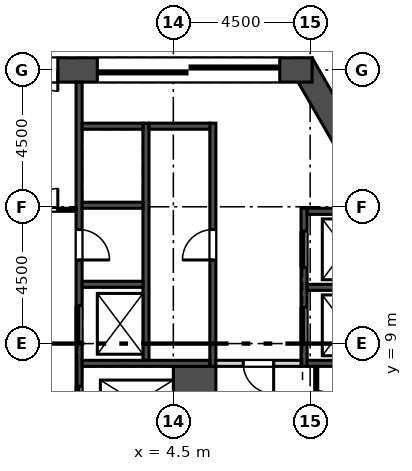
"""IFC4 building model, lengths in metres.
Left out: names, types, materials, properties, quantities, classifications, styles, units other than length and angle.
Written with IfcOpenShell. Run it as: python <this file> out.ifc"""

import sys

from ifc_helpers import new_model, si_unit, direction, frame, frame_2d, origin, place, context, subcontext, project, spatial, rectangle, extrude, element, fill, save


model = new_model("IFC4")
c1 = context("Model", 3, precision=1e-05, world=origin(), true_north=direction((0.0, 1.0)))
c2 = subcontext(c1, "Body", "Model", "MODEL_VIEW")
j1 = project(units=[si_unit("LENGTHUNIT", "METRE"), si_unit("PLANEANGLEUNIT", "RADIAN")], contexts=[c1])
p1 = place(None, origin())
s1 = spatial("IfcSite", under=j1, at=p1, CompositionType="ELEMENT")
p2 = place(p1, origin())
s2 = spatial("IfcBuilding", under=s1, at=p2, CompositionType="ELEMENT")
p3 = place(p2, frame((0.0, 0.0, 335.1)))
s3 = spatial("IfcBuildingStorey", under=s2, at=p3, CompositionType="ELEMENT", Elevation=335.1)
p4 = place(p3, frame((13.054, 10.692, 0.0), z_axis=(0.0, 0.0, 1.0), x_axis=(-0.500015780397, 0.866016292776, 0.0)))
e1 = element("IfcWall", 1, at=p4, inside=s3, PredefinedType="SHEAR", context=c2, shape_type="SweptSolid", body=[
    extrude(rectangle(XDim=8.67, YDim=0.8, at=frame_2d((4.335, 0.0))), origin(), (0.0, 0.0, 1.0), 4.2),
])
p5 = place(p3, frame((9.065, 18.0, 0.0), z_axis=(0.0, 0.0, 1.0), x_axis=(-1.0, 0.0, 0.0)))
e2 = element("IfcWall", 2, at=p5, inside=s3, PredefinedType="SHEAR", context=c2, shape_type="SweptSolid", body=[
    extrude(rectangle(XDim=18.13, YDim=0.8, at=frame_2d((9.065, 0.0))), origin(), (0.0, 0.0, 1.0), 4.2),
])
p6 = place(p5, frame((8.365, 0.0, 0.0)))
e3 = element("IfcOpeningElement", 3, at=p6, cuts=e2, PredefinedType="OPENING", context=c2, shape_type="SweptSolid", body=[
    extrude(rectangle(XDim=1.4, YDim=2.1, at=frame_2d((0.7, 1.05))), frame((0.0, 0.41, 0.0), z_axis=(0.0, -1.0, 0.0), x_axis=(1.0, 0.0, 0.0)), (0.0, 0.0, 1.0), 0.82),
])
p7 = place(p5, frame((11.065, 0.0, 0.0)))
e4 = element("IfcOpeningElement", 4, at=p7, cuts=e2, PredefinedType="OPENING", context=c2, shape_type="SweptSolid", body=[
    extrude(rectangle(XDim=6.0, YDim=2.4, at=frame_2d((3.0, 1.2))), frame((0.0, 0.41, 0.0), z_axis=(0.0, -1.0, 0.0), x_axis=(1.0, 0.0, 0.0)), (0.0, 0.0, 1.0), 0.82),
])
p8 = place(p5, frame((1.065, 0.0, 0.0)))
e5 = element("IfcOpeningElement", 5, at=p8, cuts=e2, PredefinedType="OPENING", context=c2, shape_type="SweptSolid", body=[
    extrude(rectangle(XDim=6.0, YDim=2.4, at=frame_2d((3.0, 1.2))), frame((0.0, 0.41, 0.0), z_axis=(0.0, -1.0, 0.0), x_axis=(1.0, 0.0, 0.0)), (0.0, 0.0, 1.0), 0.82),
])
p9 = place(p3, frame((23.788, 7.709, 0.0), z_axis=(0.0, 0.0, 1.0), x_axis=(-0.500001731347, 0.866024404189, 0.0)))
e6 = element("IfcWall", 6, at=p9, inside=s3, PredefinedType="SOLIDWALL", context=c2, shape_type="SweptSolid", body=[
    extrude(rectangle(XDim=38.87, YDim=0.34, at=frame_2d((19.435, 0.0))), origin(), (0.0, 0.0, 1.0), 3.8),
])
p10 = place(p9, frame((3.218, 0.0, 0.9)))
e7 = element("IfcOpeningElement", 7, at=p10, cuts=e6, PredefinedType="OPENING", context=c2, shape_type="SweptSolid", body=[
    extrude(rectangle(XDim=1.885, YDim=2.6, at=frame_2d((0.942, 1.3))), frame((0.0, 0.18, 0.0), z_axis=(0.0, -1.0, 0.0), x_axis=(1.0, 0.0, 0.0)), (0.0, 0.0, 1.0), 0.36),
])
p11 = place(p9, frame((6.218, 0.0, 0.9)))
e8 = element("IfcOpeningElement", 8, at=p11, cuts=e6, PredefinedType="OPENING", context=c2, shape_type="SweptSolid", body=[
    extrude(rectangle(XDim=1.885, YDim=2.6, at=frame_2d((0.942, 1.3))), frame((0.0, 0.18, 0.0), z_axis=(0.0, -1.0, 0.0), x_axis=(1.0, 0.0, 0.0)), (0.0, 0.0, 1.0), 0.36),
])
p12 = place(p9, frame((9.218, 0.0, 0.9)))
e9 = element("IfcOpeningElement", 9, at=p12, cuts=e6, PredefinedType="OPENING", context=c2, shape_type="SweptSolid", body=[
    extrude(rectangle(XDim=1.885, YDim=2.6, at=frame_2d((0.942, 1.3))), frame((0.0, 0.18, 0.0), z_axis=(0.0, -1.0, 0.0), x_axis=(1.0, 0.0, 0.0)), (0.0, 0.0, 1.0), 0.36),
])
p13 = place(p9, frame((12.218, 0.0, 0.9)))
e10 = element("IfcOpeningElement", 10, at=p13, cuts=e6, PredefinedType="OPENING", context=c2, shape_type="SweptSolid", body=[
    extrude(rectangle(XDim=1.885, YDim=2.6, at=frame_2d((0.942, 1.3))), frame((0.0, 0.18, 0.0), z_axis=(0.0, -1.0, 0.0), x_axis=(1.0, 0.0, 0.0)), (0.0, 0.0, 1.0), 0.36),
])
p14 = place(p9, frame((15.218, 0.0, 0.9)))
e11 = element("IfcOpeningElement", 11, at=p14, cuts=e6, PredefinedType="OPENING", context=c2, shape_type="SweptSolid", body=[
    extrude(rectangle(XDim=1.885, YDim=2.6, at=frame_2d((0.942, 1.3))), frame((0.0, 0.18, 0.0), z_axis=(0.0, -1.0, 0.0), x_axis=(1.0, 0.0, 0.0)), (0.0, 0.0, 1.0), 0.36),
])
p15 = place(p9, frame((18.218, 0.0, 0.9)))
e12 = element("IfcOpeningElement", 12, at=p15, cuts=e6, PredefinedType="OPENING", context=c2, shape_type="SweptSolid", body=[
    extrude(rectangle(XDim=1.885, YDim=2.6, at=frame_2d((0.942, 1.3))), frame((0.0, 0.18, 0.0), z_axis=(0.0, -1.0, 0.0), x_axis=(1.0, 0.0, 0.0)), (0.0, 0.0, 1.0), 0.36),
])
p16 = place(p9, frame((21.218, 0.0, 0.9)))
e13 = element("IfcOpeningElement", 13, at=p16, cuts=e6, PredefinedType="OPENING", context=c2, shape_type="SweptSolid", body=[
    extrude(rectangle(XDim=1.885, YDim=2.6, at=frame_2d((0.942, 1.3))), frame((0.0, 0.18, 0.0), z_axis=(0.0, -1.0, 0.0), x_axis=(1.0, 0.0, 0.0)), (0.0, 0.0, 1.0), 0.36),
])
p17 = place(p9, frame((24.218, 0.0, 0.9)))
e14 = element("IfcOpeningElement", 14, at=p17, cuts=e6, PredefinedType="OPENING", context=c2, shape_type="SweptSolid", body=[
    extrude(rectangle(XDim=1.885, YDim=2.6, at=frame_2d((0.942, 1.3))), frame((0.0, 0.18, 0.0), z_axis=(0.0, -1.0, 0.0), x_axis=(1.0, 0.0, 0.0)), (0.0, 0.0, 1.0), 0.36),
])
p18 = place(p9, frame((27.218, 0.0, 0.9)))
e15 = element("IfcOpeningElement", 15, at=p18, cuts=e6, PredefinedType="OPENING", context=c2, shape_type="SweptSolid", body=[
    extrude(rectangle(XDim=1.885, YDim=2.6, at=frame_2d((0.942, 1.3))), frame((0.0, 0.18, 0.0), z_axis=(0.0, -1.0, 0.0), x_axis=(1.0, 0.0, 0.0)), (0.0, 0.0, 1.0), 0.36),
])
p19 = place(p9, frame((30.218, 0.0, 0.9)))
e16 = element("IfcOpeningElement", 16, at=p19, cuts=e6, PredefinedType="OPENING", context=c2, shape_type="SweptSolid", body=[
    extrude(rectangle(XDim=1.885, YDim=2.6, at=frame_2d((0.942, 1.3))), frame((0.0, 0.18, 0.0), z_axis=(0.0, -1.0, 0.0), x_axis=(1.0, 0.0, 0.0)), (0.0, 0.0, 1.0), 0.36),
])
p20 = place(p9, frame((33.218, 0.0, 0.9)))
e17 = element("IfcOpeningElement", 17, at=p20, cuts=e6, PredefinedType="OPENING", context=c2, shape_type="SweptSolid", body=[
    extrude(rectangle(XDim=1.885, YDim=2.6, at=frame_2d((0.942, 1.3))), frame((0.0, 0.18, 0.0), z_axis=(0.0, -1.0, 0.0), x_axis=(1.0, 0.0, 0.0)), (0.0, 0.0, 1.0), 0.36),
])
p21 = place(p9, frame((1.051, 0.0, 0.9)))
e18 = element("IfcOpeningElement", 18, at=p21, cuts=e6, PredefinedType="OPENING", context=c2, shape_type="SweptSolid", body=[
    extrude(rectangle(XDim=1.115, YDim=2.4, at=frame_2d((0.558, 1.2))), frame((0.0, 0.18, 0.0), z_axis=(0.0, -1.0, 0.0), x_axis=(1.0, 0.0, 0.0)), (0.0, 0.0, 1.0), 0.36),
])
p22 = place(p9, frame((36.429, 0.0, 0.9)))
e19 = element("IfcOpeningElement", 19, at=p22, cuts=e6, PredefinedType="OPENING", context=c2, shape_type="SweptSolid", body=[
    extrude(rectangle(XDim=1.115, YDim=2.4, at=frame_2d((0.558, 1.2))), frame((0.0, 0.18, 0.0), z_axis=(0.0, -1.0, 0.0), x_axis=(1.0, 0.0, 0.0)), (0.0, 0.0, 1.0), 0.36),
])
p23 = place(p3, frame((8.8, 8.25, -0.4), z_axis=(0.0, 0.0, 1.0), x_axis=(0.0, 1.0, 0.0)))
e20 = element("IfcWall", 20, at=p23, inside=s3, PredefinedType="SOLIDWALL", context=c2, shape_type="SweptSolid", body=[
    extrude(rectangle(XDim=5.2, YDim=0.2, at=frame_2d((2.6, 0.0))), origin(), (0.0, 0.0, 1.0), 4.2),
])
p24 = place(p23, frame((0.75, 0.0, 0.4)))
e21 = element("IfcOpeningElement", 21, at=p24, cuts=e20, PredefinedType="OPENING", context=c2, shape_type="SweptSolid", body=[
    extrude(rectangle(XDim=1.2, YDim=2.1, at=frame_2d((0.6, 1.05))), frame((0.0, 0.11, 0.0), z_axis=(0.0, -1.0, 0.0), x_axis=(1.0, 0.0, 0.0)), (0.0, 0.0, 1.0), 0.22),
])
p25 = place(p23, frame((3.25, 0.0, 0.4)))
e22 = element("IfcOpeningElement", 22, at=p25, cuts=e20, PredefinedType="OPENING", context=c2, shape_type="SweptSolid", body=[
    extrude(rectangle(XDim=1.2, YDim=2.1, at=frame_2d((0.6, 1.05))), frame((0.0, 0.11, 0.0), z_axis=(0.0, -1.0, 0.0), x_axis=(1.0, 0.0, 0.0)), (0.0, 0.0, 1.0), 0.22),
])
p26 = place(p3, frame((5.8, 8.25, -0.4), z_axis=(0.0, 0.0, 1.0), x_axis=(0.0, 1.0, 0.0)))
e23 = element("IfcWall", 23, at=p26, inside=s3, PredefinedType="SOLIDWALL", context=c2, shape_type="SweptSolid", body=[
    extrude(rectangle(XDim=8.0, YDim=0.2, at=frame_2d((4.0, 0.0))), origin(), (0.0, 0.0, 1.0), 4.2),
])
p27 = place(p26, frame((3.5, 0.0, 0.4)))
e24 = element("IfcOpeningElement", 24, at=p27, cuts=e23, PredefinedType="OPENING", context=c2, shape_type="SweptSolid", body=[
    extrude(rectangle(XDim=1.0, YDim=2.1, at=frame_2d((0.5, 1.05))), frame((0.0, 0.11, 0.0), z_axis=(0.0, -1.0, 0.0), x_axis=(1.0, 0.0, 0.0)), (0.0, 0.0, 1.0), 0.22),
])
p28 = place(p3, frame((3.6, 8.45, -0.4), z_axis=(0.0, 0.0, 1.0), x_axis=(0.0, 1.0, 0.0)))
e25 = element("IfcWall", 25, at=p28, inside=s3, PredefinedType="SOLIDWALL", context=c2, shape_type="SweptSolid", body=[
    extrude(rectangle(XDim=7.8, YDim=0.2, at=frame_2d((3.9, 0.0))), origin(), (0.0, 0.0, 1.0), 4.2),
])
p29 = place(p3, frame((1.4, 5.85, -0.4), z_axis=(0.0, 0.0, 1.0), x_axis=(0.0, 1.0, 0.0)))
e26 = element("IfcWall", 26, at=p29, inside=s3, PredefinedType="SOLIDWALL", context=c2, shape_type="SweptSolid", body=[
    extrude(rectangle(XDim=11.75, YDim=0.2, at=frame_2d((5.875, 0.0))), origin(), (0.0, 0.0, 1.0), 4.2),
])
p30 = place(p29, frame((3.2, 0.0, 0.4)))
e27 = element("IfcOpeningElement", 27, at=p30, cuts=e26, PredefinedType="OPENING", context=c2, shape_type="SweptSolid", body=[
    extrude(rectangle(XDim=1.2, YDim=2.1, at=frame_2d((0.6, 1.05))), frame((0.0, 0.11, 0.0), z_axis=(0.0, -1.0, 0.0), x_axis=(1.0, 0.0, 0.0)), (0.0, 0.0, 1.0), 0.22),
])
p31 = place(p29, frame((0.65, 0.0, 0.4)))
e28 = element("IfcOpeningElement", 28, at=p31, cuts=e26, PredefinedType="OPENING", context=c2, shape_type="SweptSolid", body=[
    extrude(rectangle(XDim=1.1, YDim=2.1, at=frame_2d((0.55, 1.05))), frame((0.0, 0.11, 0.0), z_axis=(0.0, -1.0, 0.0), x_axis=(1.0, 0.0, 0.0)), (0.0, 0.0, 1.0), 0.22),
])
p32 = place(p29, frame((5.9, 0.0, 0.4)))
e29 = element("IfcOpeningElement", 29, at=p32, cuts=e26, PredefinedType="OPENING", context=c2, shape_type="SweptSolid", body=[
    extrude(rectangle(XDim=1.0, YDim=2.1, at=frame_2d((0.5, 1.05))), frame((0.0, 0.11, 0.0), z_axis=(0.0, -1.0, 0.0), x_axis=(1.0, 0.0, 0.0)), (0.0, 0.0, 1.0), 0.22),
])
p33 = place(p3, frame((5.2, 5.85, -0.4), z_axis=(0.0, 0.0, 1.0), x_axis=(0.0, 1.0, 0.0)))
e30 = element("IfcWall", 30, at=p33, inside=s3, PredefinedType="SOLIDWALL", context=c2, shape_type="SweptSolid", body=[
    extrude(rectangle(XDim=2.4, YDim=1.4, at=frame_2d((1.2, 0.0))), origin(), (0.0, 0.0, 1.0), 4.2),
])
p34 = place(p3, frame((8.9, 8.35, -0.4), z_axis=(0.0, 0.0, 1.0), x_axis=(1.0, 0.0, 0.0)))
e31 = element("IfcWall", 31, at=p34, inside=s3, PredefinedType="SOLIDWALL", context=c2, shape_type="SweptSolid", body=[
    extrude(rectangle(XDim=2.0, YDim=0.2, at=frame_2d((1.0, 0.0))), origin(), (0.0, 0.0, 1.0), 4.2),
])
p35 = place(p3, frame((1.5, 8.35, -0.4), z_axis=(0.0, 0.0, 1.0), x_axis=(1.0, 0.0, 0.0)))
e32 = element("IfcWall", 32, at=p35, inside=s3, PredefinedType="SOLIDWALL", context=c2, shape_type="SweptSolid", body=[
    extrude(rectangle(XDim=4.2, YDim=0.2, at=frame_2d((2.1, 0.0))), origin(), (0.0, 0.0, 1.0), 4.2),
])
for number, where, z_axis, x_axis in (
    (33, (8.9, 10.85, -0.4), (0.0, 0.0, 1.0), (1.0, 0.0, 0.0)),
    (34, (8.9, 13.35, -0.4), (0.0, 0.0, 1.0), (1.0, 0.0, 0.0)),
    (35, (3.7, 16.15, -0.4), (0.0, 0.0, 1.0), (1.0, 0.0, 0.0)),
    (36, (1.5, 10.95, -0.4), (0.0, 0.0, 1.0), (1.0, 0.0, 0.0)),
    (37, (1.5, 13.55, -0.4), (0.0, 0.0, 1.0), (1.0, 0.0, 0.0)),
    (38, (1.5, 16.15, -0.4), (0.0, 0.0, 1.0), (1.0, 0.0, 0.0)),
):
    element("IfcWall", number, at=place(p3, frame(where, z_axis=z_axis, x_axis=x_axis)), inside=s3, PredefinedType="SOLIDWALL", context=c2, shape_type="SweptSolid", body=[
        extrude(rectangle(XDim=2.0, YDim=0.2, at=frame_2d((1.0, 0.0))), origin(), (0.0, 0.0, 1.0), 4.2),
    ])
p36 = place(p3, frame((9.2, 5.85, 0.0), z_axis=(0.0, 0.0, 1.0), x_axis=(0.0, 1.0, 0.0)))
e39 = element("IfcWall", 39, at=p36, inside=s3, PredefinedType="PARTITIONING", context=c2, shape_type="SweptSolid", body=[
    extrude(rectangle(XDim=2.4, YDim=0.1, at=frame_2d((1.2, 0.0))), origin(), (0.0, 0.0, 1.0), 3.8),
])
p37 = place(p36, frame((0.7, 0.0, 0.0)))
e40 = element("IfcOpeningElement", 40, at=p37, cuts=e39, PredefinedType="OPENING", context=c2, shape_type="SweptSolid", body=[
    extrude(rectangle(XDim=0.9, YDim=2.1, at=frame_2d((0.45, 1.05))), frame((0.0, 0.06, 0.0), z_axis=(0.0, -1.0, 0.0), x_axis=(1.0, 0.0, 0.0)), (0.0, 0.0, 1.0), 0.12),
])
p38 = place(p3, frame((5.9, 8.35, 0.0), z_axis=(0.0, 0.0, 1.0), x_axis=(1.0, 0.0, 0.0)))
e41 = element("IfcWall", 41, at=p38, inside=s3, PredefinedType="SOLIDWALL", context=c2, shape_type="SweptSolid", body=[
    extrude(rectangle(XDim=2.8, YDim=0.2, at=frame_2d((1.4, 0.0))), origin(), (0.0, 0.0, 1.0), 3.8),
])
p39 = place(p38, frame((0.9, 0.0, 0.0)))
e42 = element("IfcOpeningElement", 42, at=p39, cuts=e41, PredefinedType="OPENING", context=c2, shape_type="SweptSolid", body=[
    extrude(rectangle(XDim=1.0, YDim=2.1, at=frame_2d((0.5, 1.05))), frame((0.0, 0.11, 0.0), z_axis=(0.0, -1.0, 0.0), x_axis=(1.0, 0.0, 0.0)), (0.0, 0.0, 1.0), 0.22),
])
p40 = place(p3, frame((-1.3, 13.4, 0.0), z_axis=(0.0, 0.0, 1.0), x_axis=(1.0, 0.0, 0.0)))
e43 = element("IfcWall", 43, at=p40, inside=s3, PredefinedType="PARTITIONING", context=c2, shape_type="SweptSolid", body=[
    extrude(rectangle(XDim=2.6, YDim=0.1, at=frame_2d((1.3, 0.0))), origin(), (0.0, 0.0, 1.0), 3.8),
])
p41 = place(p40, frame((0.6, 0.0, 0.0)))
e44 = element("IfcOpeningElement", 44, at=p41, cuts=e43, PredefinedType="OPENING", context=c2, shape_type="SweptSolid", body=[
    extrude(rectangle(XDim=1.4, YDim=2.1, at=frame_2d((0.7, 1.05))), frame((0.0, 0.06, 0.0), z_axis=(0.0, -1.0, 0.0), x_axis=(1.0, 0.0, 0.0)), (0.0, 0.0, 1.0), 0.12),
])
p42 = place(p24, origin())
e45 = element("IfcDoor", 45, at=p42, inside=s3, OperationType="SLIDING_TO_LEFT", PredefinedType="DOOR", context=c2, shape_type="SweptSolid", body=[
    extrude(rectangle(XDim=1.2, YDim=2.1, at=frame_2d((0.6, 1.05))), frame((0.0, 0.025, 0.0), z_axis=(0.0, -1.0, 0.0), x_axis=(1.0, 0.0, 0.0)), (0.0, 0.0, 1.0), 0.05),
])
fill(e21, e45)
p43 = place(p25, origin())
e46 = element("IfcDoor", 46, at=p43, inside=s3, OperationType="SLIDING_TO_LEFT", PredefinedType="DOOR", context=c2, shape_type="SweptSolid", body=[
    extrude(rectangle(XDim=1.2, YDim=2.1, at=frame_2d((0.6, 1.05))), frame((0.0, 0.025, 0.0), z_axis=(0.0, -1.0, 0.0), x_axis=(1.0, 0.0, 0.0)), (0.0, 0.0, 1.0), 0.05),
])
fill(e22, e46)
p44 = place(p30, origin())
e47 = element("IfcDoor", 47, at=p44, inside=s3, OperationType="SLIDING_TO_LEFT", PredefinedType="DOOR", context=c2, shape_type="SweptSolid", body=[
    extrude(rectangle(XDim=1.2, YDim=2.1, at=frame_2d((0.6, 1.05))), frame((0.0, 0.025, 0.0), z_axis=(0.0, -1.0, 0.0), x_axis=(1.0, 0.0, 0.0)), (0.0, 0.0, 1.0), 0.05),
])
fill(e27, e47)
p45 = place(p31, origin())
e48 = element("IfcDoor", 48, at=p45, inside=s3, OperationType="SLIDING_TO_RIGHT", PredefinedType="DOOR", context=c2, shape_type="SweptSolid", body=[
    extrude(rectangle(XDim=1.1, YDim=2.1, at=frame_2d((0.55, 1.05))), frame((0.0, 0.025, 0.0), z_axis=(0.0, -1.0, 0.0), x_axis=(1.0, 0.0, 0.0)), (0.0, 0.0, 1.0), 0.05),
])
fill(e28, e48)
p46 = place(p27, origin())
e49 = element("IfcDoor", 49, at=p46, inside=s3, OperationType="SINGLE_SWING_LEFT", PredefinedType="DOOR", context=c2, shape_type="SweptSolid", body=[
    extrude(rectangle(XDim=1.0, YDim=2.1, at=frame_2d((0.5, 1.05))), frame((0.0, 0.025, 0.0), z_axis=(0.0, -1.0, 0.0), x_axis=(1.0, 0.0, 0.0)), (0.0, 0.0, 1.0), 0.05),
])
fill(e24, e49)
p47 = place(p32, frame((1.0, 0.0, 0.0), z_axis=(0.0, 0.0, 1.0), x_axis=(-1.0, 0.0, 0.0)))
e50 = element("IfcDoor", 50, at=p47, inside=s3, OperationType="SINGLE_SWING_RIGHT", PredefinedType="DOOR", context=c2, shape_type="SweptSolid", body=[
    extrude(rectangle(XDim=1.0, YDim=2.1, at=frame_2d((0.5, 1.05))), frame((0.0, 0.025, 0.0), z_axis=(0.0, -1.0, 0.0), x_axis=(1.0, 0.0, 0.0)), (0.0, 0.0, 1.0), 0.05),
])
fill(e29, e50)
p48 = place(p39, frame((1.0, 0.0, 0.0), z_axis=(0.0, 0.0, 1.0), x_axis=(-1.0, 0.0, 0.0)))
e51 = element("IfcDoor", 51, at=p48, inside=s3, OperationType="SINGLE_SWING_LEFT", PredefinedType="DOOR", context=c2, shape_type="SweptSolid", body=[
    extrude(rectangle(XDim=1.0, YDim=2.1, at=frame_2d((0.5, 1.05))), frame((0.0, 0.025, 0.0), z_axis=(0.0, -1.0, 0.0), x_axis=(1.0, 0.0, 0.0)), (0.0, 0.0, 1.0), 0.05),
])
fill(e42, e51)
p49 = place(p41, origin())
e52 = element("IfcDoor", 52, at=p49, inside=s3, OperationType="DOUBLE_DOOR_SINGLE_SWING", PredefinedType="DOOR", context=c2, shape_type="SweptSolid", body=[
    extrude(rectangle(XDim=1.4, YDim=2.1, at=frame_2d((0.7, 1.05))), frame((0.0, 0.025, 0.0), z_axis=(0.0, -1.0, 0.0), x_axis=(1.0, 0.0, 0.0)), (0.0, 0.0, 1.0), 0.05),
])
fill(e44, e52)
p50 = place(p6, origin())
e53 = element("IfcDoor", 53, at=p50, inside=s3, OperationType="DOUBLE_DOOR_SINGLE_SWING", PredefinedType="DOOR", context=c2, shape_type="SweptSolid", body=[
    extrude(rectangle(XDim=1.4, YDim=2.1, at=frame_2d((0.7, 1.05))), frame((0.0, 0.025, 0.0), z_axis=(0.0, -1.0, 0.0), x_axis=(1.0, 0.0, 0.0)), (0.0, 0.0, 1.0), 0.05),
])
fill(e3, e53)
p51 = place(p8, origin())
e54 = element("IfcDoor", 54, at=p51, inside=s3, OperationType="DOUBLE_DOOR_SLIDING", PredefinedType="DOOR", context=c2, shape_type="SweptSolid", body=[
    extrude(rectangle(XDim=6.0, YDim=2.4, at=frame_2d((3.0, 1.2))), frame((0.0, 0.025, 0.0), z_axis=(0.0, -1.0, 0.0), x_axis=(1.0, 0.0, 0.0)), (0.0, 0.0, 1.0), 0.05),
])
fill(e5, e54)
save(model, sys.argv[1])
